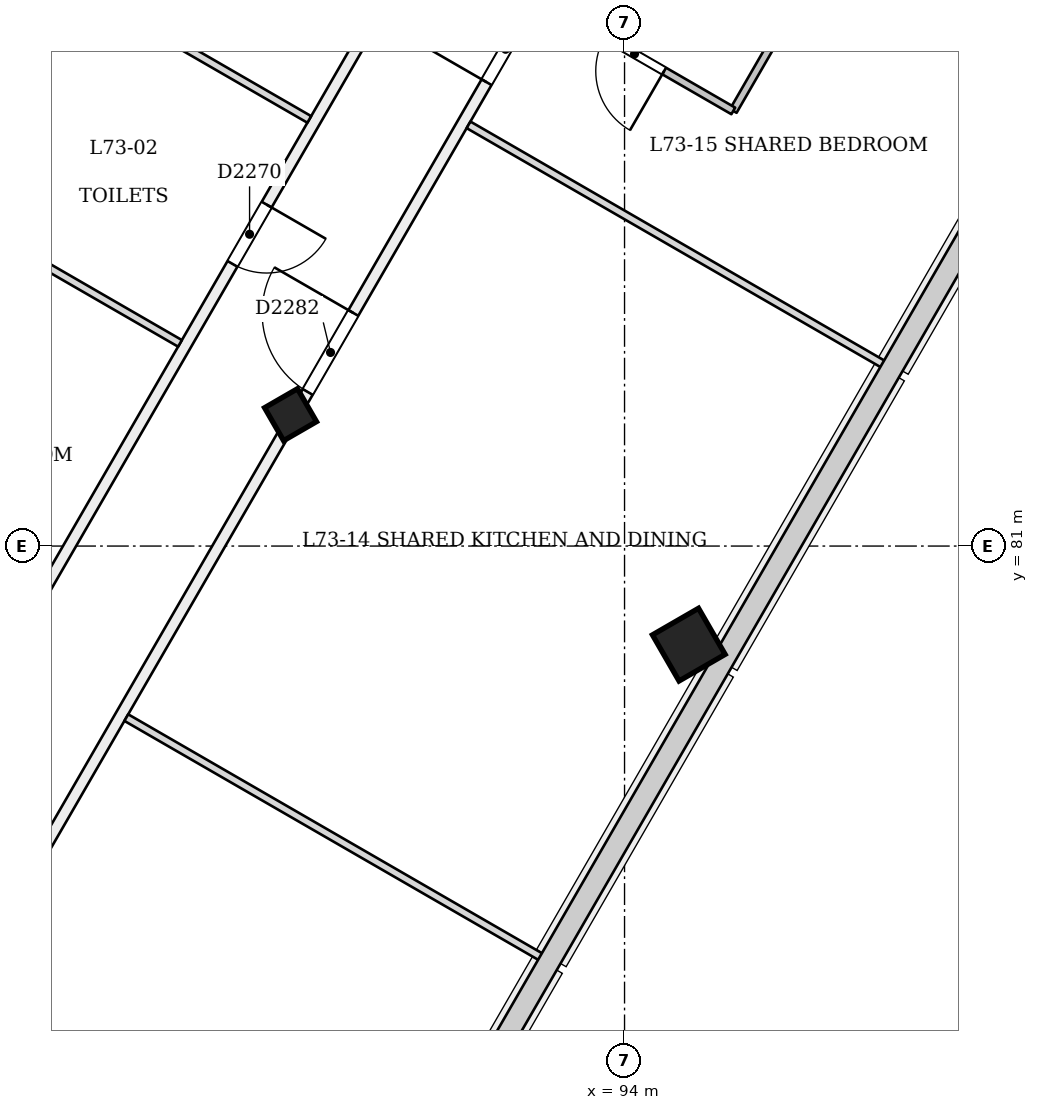
"""IFC4 building model, lengths in metres.
Left out: names, types, materials, properties, quantities, classifications, styles, units other than length and angle.
Written with IfcOpenShell. Run it as: python <this file> out.ifc"""

import sys

from ifc_helpers import new_model, si_unit, direction, frame, frame_2d, origin, origin_2d, place, context, subcontext, project, spatial, rectangle, extrude, element, fill, save


model = new_model("IFC4")
c1 = context("Model", 3, precision=1e-05, world=origin(), true_north=direction((0.0, 1.0)))
c2 = subcontext(c1, "Body", "Model", "MODEL_VIEW")
j1 = project(units=[si_unit("LENGTHUNIT", "METRE"), si_unit("PLANEANGLEUNIT", "RADIAN")], contexts=[c1])
p1 = place(None, origin())
s1 = spatial("IfcSite", under=j1, at=p1, CompositionType="ELEMENT")
p2 = place(p1, origin())
s2 = spatial("IfcBuilding", under=s1, at=p2, CompositionType="ELEMENT")
p3 = place(p2, frame((0.0, 0.0, 282.4)))
s3 = spatial("IfcBuildingStorey", under=s2, at=p3, CompositionType="ELEMENT", Elevation=282.4)
p4 = place(p3, frame((89.633, 82.681, -0.015), z_axis=(-0.02215369191, 0.038413282303, 0.999016333038), x_axis=(-0.500652759639, -0.865364210869, 0.022171982582)))
e1 = element("IfcColumn", 1, at=p4, inside=s3, PredefinedType="COLUMN", context=c2, shape_type="SweptSolid", body=[
    extrude(rectangle(XDim=0.5, YDim=0.5, at=origin_2d()), origin(), (0.0, 0.0, 1.0), 3.604),
])
p5 = place(p3, frame((94.873, 79.656, -0.021), z_axis=(-0.022225790921, 0.0383900025, 0.999015626467), x_axis=(-0.499206970832, -0.866198851621, 0.022179939665)))
e2 = element("IfcColumn", 2, at=p5, inside=s3, PredefinedType="COLUMN", context=c2, shape_type="SweptSolid", body=[
    extrude(rectangle(XDim=0.7, YDim=0.7, at=origin_2d()), origin(), (0.0, 0.0, 1.0), 3.625),
])
p6 = place(p3, frame((85.065, 74.771, 0.0), z_axis=(0.0, 0.0, 1.0), x_axis=(0.500006406735, 0.866021704823, 0.0)))
e3 = element("IfcWall", 3, at=p6, inside=s3, PredefinedType="PARTITIONING", context=c2, shape_type="SweptSolid", body=[
    extrude(rectangle(XDim=18.135, YDim=0.15, at=frame_2d((9.067, 0.0))), origin(), (0.0, 0.0, 1.0), 2.9),
])
p7 = place(p6, frame((9.534, 0.0, 0.0)))
e4 = element("IfcOpeningElement", 4, at=p7, cuts=e3, PredefinedType="OPENING", context=c2, shape_type="SweptSolid", body=[
    extrude(rectangle(XDim=1.2, YDim=2.1, at=frame_2d((0.6, 1.05))), frame((0.0, 0.085, 0.0), z_axis=(0.0, -1.0, 0.0), x_axis=(1.0, 0.0, 0.0)), (0.0, 0.0, 1.0), 0.171),
])
p8 = place(p6, frame((14.24, 0.0, 0.0)))
e5 = element("IfcOpeningElement", 5, at=p8, cuts=e3, PredefinedType="OPENING", context=c2, shape_type="SweptSolid", body=[
    extrude(rectangle(XDim=1.0, YDim=2.1, at=frame_2d((0.5, 1.05))), frame((0.0, 0.085, 0.0), z_axis=(0.0, -1.0, 0.0), x_axis=(1.0, 0.0, 0.0)), (0.0, 0.0, 1.0), 0.171),
])
p9 = place(p3, frame((92.234, 90.587, 0.0), z_axis=(0.0, 0.0, 1.0), x_axis=(-0.500006930241, -0.866021402571, 0.0)))
e6 = element("IfcWall", 6, at=p9, inside=s3, PredefinedType="PARTITIONING", context=c2, shape_type="SweptSolid", body=[
    extrude(rectangle(XDim=14.338, YDim=0.15, at=frame_2d((7.169, 0.0))), origin(), (0.0, 0.0, 1.0), 3.3),
])
p10 = place(p9, frame((5.884, 0.0, 0.0)))
e7 = element("IfcOpeningElement", 7, at=p10, cuts=e6, PredefinedType="OPENING", context=c2, shape_type="SweptSolid", body=[
    extrude(rectangle(XDim=0.9, YDim=2.1, at=frame_2d((0.45, 1.05))), frame((0.0, 0.085, 0.0), z_axis=(0.0, -1.0, 0.0), x_axis=(1.0, 0.0, 0.0)), (0.0, 0.0, 1.0), 0.171),
])
p11 = place(p3, frame((89.852, 86.613, 0.0), z_axis=(0.0, 0.0, 1.0), x_axis=(-0.866052648448, 0.499952807888, 0.0)))
e8 = element("IfcWall", 8, at=p11, inside=s3, PredefinedType="PARTITIONING", context=c2, shape_type="SweptSolid", body=[
    extrude(rectangle(XDim=3.67, YDim=0.1, at=frame_2d((1.835, 0.0))), origin(), (0.0, 0.0, 1.0), 3.3),
])
p12 = place(p3, frame((87.859, 90.6, 0.0), z_axis=(0.0, 0.0, 1.0), x_axis=(-0.500002871521, -0.866023745905, 0.0)))
e9 = element("IfcWall", 9, at=p12, inside=s3, PredefinedType="PARTITIONING", context=c2, shape_type="SweptSolid", body=[
    extrude(rectangle(XDim=5.878, YDim=0.1, at=frame_2d((2.939, 0.0))), origin(), (0.0, 0.0, 1.0), 3.3),
])
p13 = place(p3, frame((84.93, 85.527, 0.0), z_axis=(0.0, 0.0, 1.0), x_axis=(0.866000871473, -0.500042488803, 0.0)))
e10 = element("IfcWall", 10, at=p13, inside=s3, PredefinedType="PARTITIONING", context=c2, shape_type="SweptSolid", body=[
    extrude(rectangle(XDim=3.72, YDim=0.1, at=frame_2d((1.86, 0.0))), origin(), (0.0, 0.0, 1.0), 3.3),
])
p14 = place(p3, frame((92.94, 75.571, 0.0), z_axis=(0.0, 0.0, 1.0), x_axis=(-0.866015781869, 0.500016665277, 0.0)))
e11 = element("IfcWall", 11, at=p14, inside=s3, PredefinedType="PARTITIONING", context=c2, shape_type="SweptSolid", body=[
    extrude(rectangle(XDim=6.345, YDim=0.1, at=frame_2d((3.172, 0.0))), origin(), (0.0, 0.0, 1.0), 3.3),
])
p15 = place(p3, frame((97.443, 83.369, 0.0), z_axis=(0.0, 0.0, 1.0), x_axis=(-0.866025401434, 0.500000004071, 0.0)))
e12 = element("IfcWall", 12, at=p15, inside=s3, PredefinedType="PARTITIONING", context=c2, shape_type="SweptSolid", body=[
    extrude(rectangle(XDim=6.345, YDim=0.1, at=frame_2d((3.173, 0.0))), origin(), (0.0, 0.0, 1.0), 3.3),
])
p16 = place(p3, frame((96.693, 88.911, 0.0), z_axis=(0.0, 0.0, 1.0), x_axis=(-0.50001820224, -0.866014894461, 0.0)))
e13 = element("IfcWall", 13, at=p16, inside=s3, PredefinedType="PARTITIONING", context=c2, shape_type="SweptSolid", body=[
    extrude(rectangle(XDim=2.525, YDim=0.1, at=frame_2d((1.262, 0.0))), origin(), (0.0, 0.0, 1.0), 2.9),
])
p17 = place(p3, frame((95.431, 86.725, 0.0), z_axis=(0.0, 0.0, 1.0), x_axis=(-0.866046596414, 0.499963291492, 0.0)))
e14 = element("IfcWall", 14, at=p17, inside=s3, PredefinedType="PARTITIONING", context=c2, shape_type="SweptSolid", body=[
    extrude(rectangle(XDim=2.925, YDim=0.1, at=frame_2d((1.462, 0.0))), origin(), (0.0, 0.0, 1.0), 3.3),
])
p18 = place(p17, frame((1.05, 0.0, 0.0)))
e15 = element("IfcOpeningElement", 15, at=p18, cuts=e14, PredefinedType="OPENING", context=c2, shape_type="SweptSolid", body=[
    extrude(rectangle(XDim=0.9, YDim=2.1, at=frame_2d((0.45, 1.05))), frame((0.0, 0.061, 0.0), z_axis=(0.0, -1.0, 0.0), x_axis=(1.0, 0.0, 0.0)), (0.0, 0.0, 1.0), 0.121),
])
p19 = place(p3, frame((99.675, 87.276, 0.0), z_axis=(0.0, 0.0, 1.0), x_axis=(-0.866020337685, 0.500008774639, 0.0)))
e16 = element("IfcWall", 16, at=p19, inside=s3, PredefinedType="PARTITIONING", context=c2, shape_type="SweptSolid", body=[
    extrude(rectangle(XDim=3.42, YDim=0.15, at=frame_2d((1.71, 0.0))), origin(), (0.0, 0.0, 1.0), 2.9),
])
p20 = place(p10, origin())
e17 = element("IfcDoor", 17, at=p20, inside=s3, OperationType="SINGLE_SWING_LEFT", PredefinedType="NOTDEFINED", context=c2, shape_type="SweptSolid", body=[
    extrude(rectangle(XDim=0.9, YDim=2.1, at=frame_2d((0.45, 1.05))), frame((0.0, 0.025, 0.0), z_axis=(0.0, -1.0, 0.0), x_axis=(1.0, 0.0, 0.0)), (0.0, 0.0, 1.0), 0.05),
])
fill(e7, e17)
p21 = place(p7, origin())
e18 = element("IfcDoor", 18, at=p21, inside=s3, OperationType="SINGLE_SWING_RIGHT", PredefinedType="NOTDEFINED", context=c2, shape_type="SweptSolid", body=[
    extrude(rectangle(XDim=1.2, YDim=2.1, at=frame_2d((0.6, 1.05))), frame((0.0, 0.025, 0.0), z_axis=(0.0, -1.0, 0.0), x_axis=(1.0, 0.0, 0.0)), (0.0, 0.0, 1.0), 0.05),
])
fill(e4, e18)
p22 = place(p8, origin())
e19 = element("IfcDoor", 19, at=p22, inside=s3, OperationType="SINGLE_SWING_LEFT", PredefinedType="NOTDEFINED", context=c2, shape_type="SweptSolid", body=[
    extrude(rectangle(XDim=1.0, YDim=2.1, at=frame_2d((0.5, 1.05))), frame((0.0, 0.025, 0.0), z_axis=(0.0, -1.0, 0.0), x_axis=(1.0, 0.0, 0.0)), (0.0, 0.0, 1.0), 0.05),
])
fill(e5, e19)
p23 = place(p18, origin())
e20 = element("IfcDoor", 20, at=p23, inside=s3, OperationType="SINGLE_SWING_LEFT", PredefinedType="NOTDEFINED", context=c2, shape_type="SweptSolid", body=[
    extrude(rectangle(XDim=0.9, YDim=2.1, at=frame_2d((0.45, 1.05))), frame((0.0, 0.025, 0.0), z_axis=(0.0, -1.0, 0.0), x_axis=(1.0, 0.0, 0.0)), (0.0, 0.0, 1.0), 0.05),
])
fill(e15, e20)
save(model, sys.argv[1])
